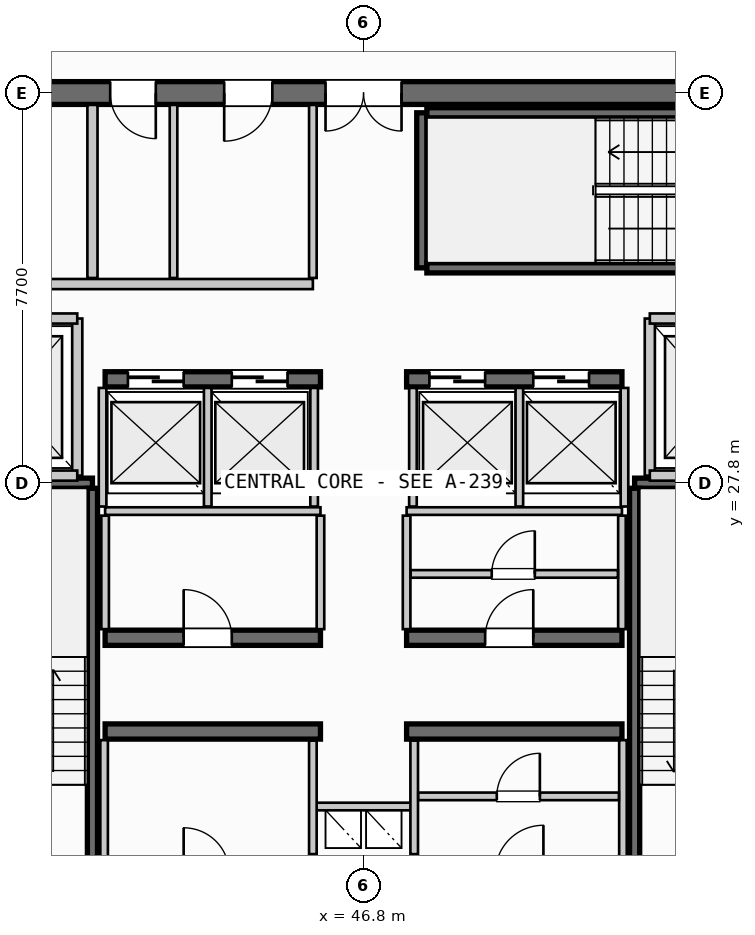
"""IFC4 building model, lengths in metres.
Left out: names, types, materials, properties, quantities, classifications, styles, units other than length and angle.
Written with IfcOpenShell. Run it as: python <this file> out.ifc"""

import sys

from ifc_helpers import new_model, si_unit, direction, frame, frame_2d, origin, place, context, subcontext, project, spatial, rectangle, extrude, source, transform, mapped, element, fill, save


model = new_model("IFC4")
c1 = context("Model", 3, precision=1e-05, world=origin(), true_north=direction((0.0, 1.0)))
c2 = subcontext(c1, "Body", "Model", "MODEL_VIEW")
j1 = project(units=[si_unit("LENGTHUNIT", "METRE"), si_unit("PLANEANGLEUNIT", "RADIAN")], contexts=[c1])
p1 = place(None, origin())
s1 = spatial("IfcSite", under=j1, at=p1, CompositionType="ELEMENT")
p2 = place(p1, origin())
s2 = spatial("IfcBuilding", under=s1, at=p2, CompositionType="ELEMENT")
p3 = place(p2, frame((0.0, 0.0, 283.6)))
s3 = spatial("IfcBuildingStorey", under=s2, at=p3, CompositionType="ELEMENT", Elevation=283.6)
p4 = place(p3, frame((55.6, 35.5, 0.0), z_axis=(0.0, 0.0, 1.0), x_axis=(-1.0, 0.0, 0.0)))
e1 = element("IfcWall", 1, at=p4, inside=s3, PredefinedType="SHEAR", context=c2, shape_type="SweptSolid", body=[
    extrude(rectangle(XDim=17.6, YDim=0.45, at=frame_2d((8.8, 0.0))), origin(), (0.0, 0.0, 1.0), 3.21),
])
p5 = place(p4, frame((8.05, 0.0, 0.0)))
e2 = element("IfcOpeningElement", 2, at=p5, cuts=e1, PredefinedType="OPENING", context=c2, shape_type="SweptSolid", body=[
    extrude(rectangle(XDim=1.5, YDim=2.2, at=frame_2d((0.75, 1.1))), frame((0.0, 0.235, 0.0), z_axis=(0.0, -1.0, 0.0), x_axis=(1.0, 0.0, 0.0)), (0.0, 0.0, 1.0), 0.47),
])
p6 = place(p4, frame((15.1, 0.0, 0.0)))
e3 = element("IfcOpeningElement", 3, at=p6, cuts=e1, PredefinedType="OPENING", context=c2, shape_type="SweptSolid", body=[
    extrude(rectangle(XDim=0.95, YDim=2.15, at=frame_2d((0.475, 1.075))), frame((0.0, 0.235, 0.0), z_axis=(0.0, -1.0, 0.0), x_axis=(1.0, 0.0, 0.0)), (0.0, 0.0, 1.0), 0.47),
])
p7 = place(p4, frame((12.9, 0.0, 0.0)))
e4 = element("IfcOpeningElement", 4, at=p7, cuts=e1, PredefinedType="OPENING", context=c2, shape_type="SweptSolid", body=[
    extrude(rectangle(XDim=0.9, YDim=2.15, at=frame_2d((0.45, 1.075))), frame((0.0, 0.235, 0.0), z_axis=(0.0, -1.0, 0.0), x_axis=(1.0, 0.0, 0.0)), (0.0, 0.0, 1.0), 0.47),
])
p8 = place(p4, frame((10.6, 0.0, 0.0)))
e5 = element("IfcOpeningElement", 5, at=p8, cuts=e1, PredefinedType="OPENING", context=c2, shape_type="SweptSolid", body=[
    extrude(rectangle(XDim=0.95, YDim=2.15, at=frame_2d((0.475, 1.075))), frame((0.0, 0.235, 0.0), z_axis=(0.0, -1.0, 0.0), x_axis=(1.0, 0.0, 0.0)), (0.0, 0.0, 1.0), 0.47),
])
for number, where, z_axis, x_axis in (
    (6, (41.7, 22.9, 0.0), (0.0, 0.0, 1.0), (1.0, 0.0, 0.0)),
    (7, (47.65, 22.9, 0.0), (0.0, 0.0, 1.0), (1.0, 0.0, 0.0)),
):
    element("IfcWall", number, at=place(p3, frame(where, z_axis=z_axis, x_axis=x_axis)), inside=s3, PredefinedType="SHEAR", context=c2, shape_type="SweptSolid", body=[
        extrude(rectangle(XDim=4.25, YDim=0.3, at=frame_2d((2.125, 0.0))), origin(), (0.0, 0.0, 1.0), 3.21),
    ])
p9 = place(p3, frame((41.7, 24.75, 0.0), z_axis=(0.0, 0.0, 1.0), x_axis=(1.0, 0.0, 0.0)))
e8 = element("IfcWall", 8, at=p9, inside=s3, PredefinedType="SHEAR", context=c2, shape_type="SweptSolid", body=[
    extrude(rectangle(XDim=4.25, YDim=0.3, at=frame_2d((2.125, 0.0))), origin(), (0.0, 0.0, 1.0), 3.21),
])
p10 = place(p9, frame((1.55, 0.0, 0.0)))
e9 = element("IfcOpeningElement", 9, at=p10, cuts=e8, PredefinedType="OPENING", context=c2, shape_type="SweptSolid", body=[
    extrude(rectangle(XDim=0.95, YDim=2.15, at=frame_2d((0.475, 1.075))), frame((0.0, 0.16, 0.0), z_axis=(0.0, -1.0, 0.0), x_axis=(1.0, 0.0, 0.0)), (0.0, 0.0, 1.0), 0.32),
])
p11 = place(p3, frame((47.65, 24.75, 0.0), z_axis=(0.0, 0.0, 1.0), x_axis=(1.0, 0.0, 0.0)))
e10 = element("IfcWall", 10, at=p11, inside=s3, PredefinedType="SHEAR", context=c2, shape_type="SweptSolid", body=[
    extrude(rectangle(XDim=4.25, YDim=0.3, at=frame_2d((2.125, 0.0))), origin(), (0.0, 0.0, 1.0), 3.21),
])
p12 = place(p11, frame((1.55, 0.0, 0.0)))
e11 = element("IfcOpeningElement", 11, at=p12, cuts=e10, PredefinedType="OPENING", context=c2, shape_type="SweptSolid", body=[
    extrude(rectangle(XDim=0.95, YDim=2.15, at=frame_2d((0.475, 1.075))), frame((0.0, 0.16, 0.0), z_axis=(0.0, -1.0, 0.0), x_axis=(1.0, 0.0, 0.0)), (0.0, 0.0, 1.0), 0.32),
])
p13 = place(p3, frame((41.7, 29.85, 0.0), z_axis=(0.0, 0.0, 1.0), x_axis=(1.0, 0.0, 0.0)))
e12 = element("IfcWall", 12, at=p13, inside=s3, PredefinedType="SHEAR", context=c2, shape_type="SweptSolid", body=[
    extrude(rectangle(XDim=4.25, YDim=0.3, at=frame_2d((2.125, 0.0))), origin(), (0.0, 0.0, 1.0), 3.21),
])
p14 = place(p13, frame((0.45, 0.0, 0.0)))
e13 = element("IfcOpeningElement", 13, at=p14, cuts=e12, PredefinedType="OPENING", context=c2, shape_type="SweptSolid", body=[
    extrude(rectangle(XDim=1.1, YDim=2.2, at=frame_2d((0.55, 1.1))), frame((0.0, 0.16, 0.0), z_axis=(0.0, -1.0, 0.0), x_axis=(1.0, 0.0, 0.0)), (0.0, 0.0, 1.0), 0.32),
])
p15 = place(p13, frame((2.5, 0.0, 0.0)))
e14 = element("IfcOpeningElement", 14, at=p15, cuts=e12, PredefinedType="OPENING", context=c2, shape_type="SweptSolid", body=[
    extrude(rectangle(XDim=1.1, YDim=2.2, at=frame_2d((0.55, 1.1))), frame((0.0, 0.16, 0.0), z_axis=(0.0, -1.0, 0.0), x_axis=(1.0, 0.0, 0.0)), (0.0, 0.0, 1.0), 0.32),
])
p16 = place(p3, frame((47.65, 29.85, 0.0), z_axis=(0.0, 0.0, 1.0), x_axis=(1.0, 0.0, 0.0)))
e15 = element("IfcWall", 15, at=p16, inside=s3, PredefinedType="SHEAR", context=c2, shape_type="SweptSolid", body=[
    extrude(rectangle(XDim=4.25, YDim=0.3, at=frame_2d((2.125, 0.0))), origin(), (0.0, 0.0, 1.0), 3.21),
])
p17 = place(p16, frame((0.45, 0.0, 0.0)))
e16 = element("IfcOpeningElement", 16, at=p17, cuts=e15, PredefinedType="OPENING", context=c2, shape_type="SweptSolid", body=[
    extrude(rectangle(XDim=1.1, YDim=2.2, at=frame_2d((0.55, 1.1))), frame((0.0, 0.16, 0.0), z_axis=(0.0, -1.0, 0.0), x_axis=(1.0, 0.0, 0.0)), (0.0, 0.0, 1.0), 0.32),
])
p18 = place(p16, frame((2.5, 0.0, 0.0)))
e17 = element("IfcOpeningElement", 17, at=p18, cuts=e15, PredefinedType="OPENING", context=c2, shape_type="SweptSolid", body=[
    extrude(rectangle(XDim=1.1, YDim=2.2, at=frame_2d((0.55, 1.1))), frame((0.0, 0.16, 0.0), z_axis=(0.0, -1.0, 0.0), x_axis=(1.0, 0.0, 0.0)), (0.0, 0.0, 1.0), 0.32),
])
p19 = place(p3, frame((38.39, 27.8, 0.0), z_axis=(0.0, 0.0, 1.0), x_axis=(1.0, 0.0, 0.0)))
e18 = element("IfcWall", 18, at=p19, inside=s3, PredefinedType="SHEAR", context=c2, shape_type="SweptSolid", body=[
    extrude(rectangle(XDim=3.06, YDim=0.2, at=frame_2d((1.53, 0.0))), origin(), (0.0, 0.0, 1.0), 3.21),
])
p20 = place(p3, frame((41.45, 27.7, 0.0), z_axis=(0.0, 0.0, 1.0), x_axis=(0.0, -1.0, 0.0)))
e19 = element("IfcWall", 19, at=p20, inside=s3, PredefinedType="SHEAR", context=c2, shape_type="SweptSolid", body=[
    extrude(rectangle(XDim=7.35, YDim=0.2, at=frame_2d((3.675, 0.0))), origin(), (0.0, 0.0, 1.0), 3.21),
])
p21 = place(p3, frame((52.15, 27.8, 0.0), z_axis=(0.0, 0.0, 1.0), x_axis=(1.0, 0.0, 0.0)))
e20 = element("IfcWall", 20, at=p21, inside=s3, PredefinedType="SHEAR", context=c2, shape_type="SweptSolid", body=[
    extrude(rectangle(XDim=3.06, YDim=0.2, at=frame_2d((1.53, 0.0))), origin(), (0.0, 0.0, 1.0), 3.21),
])
p22 = place(p3, frame((52.15, 20.35, 0.0), z_axis=(0.0, 0.0, 1.0), x_axis=(0.0, 1.0, 0.0)))
e21 = element("IfcWall", 21, at=p22, inside=s3, PredefinedType="SHEAR", context=c2, shape_type="SweptSolid", body=[
    extrude(rectangle(XDim=7.35, YDim=0.2, at=frame_2d((3.675, 0.0))), origin(), (0.0, 0.0, 1.0), 3.21),
])
p23 = place(p3, frame((47.95, 32.05, 0.0), z_axis=(0.0, 0.0, 1.0), x_axis=(0.0, 1.0, 0.0)))
e22 = element("IfcWall", 22, at=p23, inside=s3, PredefinedType="SHEAR", context=c2, shape_type="SweptSolid", body=[
    extrude(rectangle(XDim=3.06, YDim=0.2, at=frame_2d((1.53, 0.0))), origin(), (0.0, 0.0, 1.0), 3.21),
])
for number, where, z_axis, x_axis in (
    (23, (48.05, 35.11, 0.0), (0.0, 0.0, 1.0), (1.0, 0.0, 0.0)),
    (24, (55.4, 32.05, 0.0), (0.0, 0.0, 1.0), (-1.0, 0.0, 0.0)),
):
    element("IfcWall", number, at=place(p3, frame(where, z_axis=z_axis, x_axis=x_axis)), inside=s3, PredefinedType="SHEAR", context=c2, shape_type="SweptSolid", body=[
        extrude(rectangle(XDim=7.35, YDim=0.2, at=frame_2d((3.675, 0.0))), origin(), (0.0, 0.0, 1.0), 3.21),
    ])
p24 = place(p3, frame((45.8, 21.42, 0.0), z_axis=(0.0, 0.0, 1.0), x_axis=(1.0, 0.0, 0.0)))
e25 = element("IfcWall", 25, at=p24, inside=s3, PredefinedType="PARTITIONING", context=c2, shape_type="SweptSolid", body=[
    extrude(rectangle(XDim=2.0, YDim=0.15, at=frame_2d((1.0, 0.0))), origin(), (0.0, 0.0, 1.0), 2.455),
])
for number, where, z_axis, x_axis in (
    (26, (45.8, 20.48, 0.0), (0.0, 0.0, 1.0), (0.0, 1.0, 0.0)),
    (27, (47.8, 20.48, 0.0), (0.0, 0.0, 1.0), (0.0, 1.0, 0.0)),
):
    element("IfcWall", number, at=place(p3, frame(where, z_axis=z_axis, x_axis=x_axis)), inside=s3, PredefinedType="PARTITIONING", context=c2, shape_type="SweptSolid", body=[
        extrude(rectangle(XDim=2.24, YDim=0.15, at=frame_2d((1.12, 0.0))), origin(), (0.0, 0.0, 1.0), 2.455),
    ])
p25 = place(p3, frame((41.15, 27.95, 0.0), z_axis=(0.0, 0.0, 1.0), x_axis=(0.0, 1.0, 0.0)))
e28 = element("IfcWall", 28, at=p25, inside=s3, PredefinedType="PARTITIONING", context=c2, shape_type="SweptSolid", body=[
    extrude(rectangle(XDim=3.1, YDim=0.2, at=frame_2d((1.55, 0.0))), origin(), (0.0, 0.0, 1.0), 2.455),
])
for number, where, z_axis, x_axis in (
    (29, (38.235, 27.95, 0.0), (0.0, 0.0, 1.0), (1.0, 0.0, 0.0)),
    (30, (38.235, 31.05, 0.0), (0.0, 0.0, 1.0), (1.0, 0.0, 0.0)),
):
    element("IfcWall", number, at=place(p3, frame(where, z_axis=z_axis, x_axis=x_axis)), inside=s3, PredefinedType="PARTITIONING", context=c2, shape_type="SweptSolid", body=[
        extrude(rectangle(XDim=2.915, YDim=0.2, at=frame_2d((1.458, 0.0))), origin(), (0.0, 0.0, 1.0), 2.455),
    ])
p26 = place(p3, frame((52.45, 27.95, 0.0), z_axis=(0.0, 0.0, 1.0), x_axis=(0.0, 1.0, 0.0)))
e31 = element("IfcWall", 31, at=p26, inside=s3, PredefinedType="PARTITIONING", context=c2, shape_type="SweptSolid", body=[
    extrude(rectangle(XDim=3.1, YDim=0.2, at=frame_2d((1.55, 0.0))), origin(), (0.0, 0.0, 1.0), 2.455),
])
for number, where, z_axis, x_axis in (
    (32, (52.45, 27.95, 0.0), (0.0, 0.0, 1.0), (1.0, 0.0, 0.0)),
    (33, (52.45, 31.05, 0.0), (0.0, 0.0, 1.0), (1.0, 0.0, 0.0)),
):
    element("IfcWall", number, at=place(p3, frame(where, z_axis=z_axis, x_axis=x_axis)), inside=s3, PredefinedType="PARTITIONING", context=c2, shape_type="SweptSolid", body=[
        extrude(rectangle(XDim=2.915, YDim=0.2, at=frame_2d((1.458, 0.0))), origin(), (0.0, 0.0, 1.0), 2.455),
    ])
for number, where, z_axis, x_axis in (
    (34, (41.68, 20.335, 0.0), (0.0, 0.0, 1.0), (0.0, 1.0, 0.0)),
    (35, (51.92, 20.335, 0.0), (0.0, 0.0, 1.0), (0.0, 1.0, 0.0)),
):
    element("IfcWall", number, at=place(p3, frame(where, z_axis=z_axis, x_axis=x_axis)), inside=s3, PredefinedType="PARTITIONING", context=c2, shape_type="SweptSolid", body=[
        extrude(rectangle(XDim=2.395, YDim=0.15, at=frame_2d((1.198, 0.0))), origin(), (0.0, 0.0, 1.0), 2.455),
    ])
p27 = place(p3, frame((47.88, 21.62, 0.0), z_axis=(0.0, 0.0, 1.0), x_axis=(1.0, 0.0, 0.0)))
e36 = element("IfcWall", 36, at=p27, inside=s3, PredefinedType="PARTITIONING", context=c2, shape_type="SweptSolid", body=[
    extrude(rectangle(XDim=3.96, YDim=0.15, at=frame_2d((1.98, 0.0))), origin(), (0.0, 0.0, 1.0), 2.455),
])
p28 = place(p27, frame((1.55, 0.0, 0.0)))
e37 = element("IfcOpeningElement", 37, at=p28, cuts=e36, PredefinedType="OPENING", context=c2, shape_type="SweptSolid", body=[
    extrude(rectangle(XDim=0.85, YDim=2.15, at=frame_2d((0.425, 1.075))), frame((0.0, 0.085, 0.0), z_axis=(0.0, -1.0, 0.0), x_axis=(1.0, 0.0, 0.0)), (0.0, 0.0, 1.0), 0.17),
])
for number, where, z_axis, x_axis in (
    (38, (41.7, 27.25, 0.0), (0.0, 0.0, 1.0), (1.0, 0.0, 0.0)),
    (39, (47.65, 27.25, 0.0), (0.0, 0.0, 1.0), (1.0, 0.0, 0.0)),
):
    element("IfcWall", number, at=place(p3, frame(where, z_axis=z_axis, x_axis=x_axis)), inside=s3, PredefinedType="PARTITIONING", context=c2, shape_type="SweptSolid", body=[
        extrude(rectangle(XDim=4.25, YDim=0.15, at=frame_2d((2.125, 0.0))), origin(), (0.0, 0.0, 1.0), 2.455),
    ])
for number, where, z_axis, x_axis in (
    (40, (41.7, 24.92, 0.0), (0.0, 0.0, 1.0), (0.0, 1.0, 0.0)),
    (41, (45.95, 24.92, 0.0), (0.0, 0.0, 1.0), (0.0, 1.0, 0.0)),
    (42, (47.65, 24.92, 0.0), (0.0, 0.0, 1.0), (0.0, 1.0, 0.0)),
    (43, (51.9, 24.92, 0.0), (0.0, 0.0, 1.0), (0.0, 1.0, 0.0)),
):
    element("IfcWall", number, at=place(p3, frame(where, z_axis=z_axis, x_axis=x_axis)), inside=s3, PredefinedType="PARTITIONING", context=c2, shape_type="SweptSolid", body=[
        extrude(rectangle(XDim=2.24, YDim=0.15, at=frame_2d((1.12, 0.0))), origin(), (0.0, 0.0, 1.0), 2.455),
    ])
p29 = place(p3, frame((47.73, 26.01, 0.0), z_axis=(0.0, 0.0, 1.0), x_axis=(1.0, 0.0, 0.0)))
e44 = element("IfcWall", 44, at=p29, inside=s3, PredefinedType="PARTITIONING", context=c2, shape_type="SweptSolid", body=[
    extrude(rectangle(XDim=4.09, YDim=0.15, at=frame_2d((2.045, 0.0))), origin(), (0.0, 0.0, 1.0), 2.455),
])
p30 = place(p29, frame((1.6, 0.0, 0.0)))
e45 = element("IfcOpeningElement", 45, at=p30, cuts=e44, PredefinedType="OPENING", context=c2, shape_type="SweptSolid", body=[
    extrude(rectangle(XDim=0.85, YDim=2.15, at=frame_2d((0.425, 1.075))), frame((0.0, 0.085, 0.0), z_axis=(0.0, -1.0, 0.0), x_axis=(1.0, 0.0, 0.0)), (0.0, 0.0, 1.0), 0.17),
])
for number, where, z_axis, x_axis in (
    (46, (41.65, 27.34, 0.0), (0.0, 0.0, 1.0), (0.0, 1.0, 0.0)),
    (47, (43.725, 27.34, 0.0), (0.0, 0.0, 1.0), (0.0, 1.0, 0.0)),
    (48, (45.825, 27.34, 0.0), (0.0, 0.0, 1.0), (0.0, 1.0, 0.0)),
    (49, (47.775, 27.34, 0.0), (0.0, 0.0, 1.0), (0.0, 1.0, 0.0)),
    (50, (49.875, 27.34, 0.0), (0.0, 0.0, 1.0), (0.0, 1.0, 0.0)),
    (51, (51.95, 27.34, 0.0), (0.0, 0.0, 1.0), (0.0, 1.0, 0.0)),
):
    element("IfcWall", number, at=place(p3, frame(where, z_axis=z_axis, x_axis=x_axis)), inside=s3, PredefinedType="PARTITIONING", context=c2, shape_type="SweptSolid", body=[
        extrude(rectangle(XDim=2.34, YDim=0.15, at=frame_2d((1.17, 0.0))), origin(), (0.0, 0.0, 1.0), 2.455),
    ])
p31 = place(p3, frame((41.45, 31.85, 0.0), z_axis=(0.0, 0.0, 1.0), x_axis=(0.0, 1.0, 0.0)))
e52 = element("IfcWall", 52, at=p31, inside=s3, PredefinedType="PARTITIONING", context=c2, shape_type="SweptSolid", body=[
    extrude(rectangle(XDim=3.415, YDim=0.2, at=frame_2d((1.708, 0.0))), origin(), (0.0, 0.0, 1.0), 2.455),
])
p32 = place(p3, frame((38.235, 31.73, 0.0), z_axis=(0.0, 0.0, 1.0), x_axis=(1.0, 0.0, 0.0)))
e53 = element("IfcWall", 53, at=p32, inside=s3, PredefinedType="PARTITIONING", context=c2, shape_type="SweptSolid", body=[
    extrude(rectangle(XDim=7.565, YDim=0.2, at=frame_2d((3.782, 0.0))), origin(), (0.0, 0.0, 1.0), 2.455),
])
p33 = place(p3, frame((45.8, 31.85, 0.0), z_axis=(0.0, 0.0, 1.0), x_axis=(0.0, 1.0, 0.0)))
e54 = element("IfcWall", 54, at=p33, inside=s3, PredefinedType="PARTITIONING", context=c2, shape_type="SweptSolid", body=[
    extrude(rectangle(XDim=3.415, YDim=0.15, at=frame_2d((1.708, 0.0))), origin(), (0.0, 0.0, 1.0), 2.455),
])
p34 = place(p3, frame((43.05, 31.85, 0.0), z_axis=(0.0, 0.0, 1.0), x_axis=(0.0, 1.0, 0.0)))
e55 = element("IfcWall", 55, at=p34, inside=s3, PredefinedType="PLUMBINGWALL", context=c2, shape_type="SweptSolid", body=[
    extrude(rectangle(XDim=3.415, YDim=0.15, at=frame_2d((1.708, 0.0))), origin(), (0.0, 0.0, 1.0), 2.455),
])
m1 = source(origin(), c2, "Body", "SweptSolid", [
    extrude(rectangle(XDim=1.5, YDim=2.2, at=frame_2d((0.75, 1.1))), frame((0.0, 0.025, 0.0), z_axis=(0.0, -1.0, 0.0), x_axis=(1.0, 0.0, 0.0)), (0.0, 0.0, 1.0), 0.05),
])
p35 = place(p5, origin())
e56 = element("IfcDoor", 56, at=p35, inside=s3, OperationType="DOUBLE_DOOR_SINGLE_SWING", PredefinedType="DOOR", context=c2, shape_type="MappedRepresentation", body=[
    mapped(m1, transform((0.0, 0.0, 0.0), scale=1.0)),
])
fill(e2, e56)
m2 = source(origin(), c2, "Body", "SweptSolid", [
    extrude(rectangle(XDim=0.95, YDim=2.15, at=frame_2d((0.475, 1.075))), frame((0.0, 0.025, 0.0), z_axis=(0.0, -1.0, 0.0), x_axis=(1.0, 0.0, 0.0)), (0.0, 0.0, 1.0), 0.05),
])
p36 = place(p10, origin())
e57 = element("IfcDoor", 57, at=p36, inside=s3, OperationType="SINGLE_SWING_LEFT", PredefinedType="DOOR", context=c2, shape_type="MappedRepresentation", body=[
    mapped(m2, transform((0.0, 0.0, 0.0), scale=1.0)),
])
fill(e9, e57)
p37 = place(p12, origin())
e58 = element("IfcDoor", 58, at=p37, inside=s3, OperationType="SINGLE_SWING_RIGHT", PredefinedType="DOOR", context=c2, shape_type="MappedRepresentation", body=[
    mapped(m2, transform((0.0, 0.0, 0.0), scale=1.0)),
])
fill(e11, e58)
m3 = source(origin(), c2, "Body", "SweptSolid", [
    extrude(rectangle(XDim=1.1, YDim=2.2, at=frame_2d((0.55, 1.1))), frame((0.0, 0.025, 0.0), z_axis=(0.0, -1.0, 0.0), x_axis=(1.0, 0.0, 0.0)), (0.0, 0.0, 1.0), 0.05),
])
p38 = place(p14, origin())
e59 = element("IfcDoor", 59, at=p38, inside=s3, OperationType="SLIDING_TO_LEFT", PredefinedType="DOOR", context=c2, shape_type="MappedRepresentation", body=[
    mapped(m3, transform((0.0, 0.0, 0.0), scale=1.0)),
])
fill(e13, e59)
p39 = place(p15, origin())
e60 = element("IfcDoor", 60, at=p39, inside=s3, OperationType="SLIDING_TO_LEFT", PredefinedType="DOOR", context=c2, shape_type="MappedRepresentation", body=[
    mapped(m3, transform((0.0, 0.0, 0.0), scale=1.0)),
])
fill(e14, e60)
p40 = place(p17, origin())
e61 = element("IfcDoor", 61, at=p40, inside=s3, OperationType="SLIDING_TO_LEFT", PredefinedType="DOOR", context=c2, shape_type="MappedRepresentation", body=[
    mapped(m3, transform((0.0, 0.0, 0.0), scale=1.0)),
])
fill(e16, e61)
p41 = place(p18, origin())
e62 = element("IfcDoor", 62, at=p41, inside=s3, OperationType="SLIDING_TO_LEFT", PredefinedType="DOOR", context=c2, shape_type="MappedRepresentation", body=[
    mapped(m3, transform((0.0, 0.0, 0.0), scale=1.0)),
])
fill(e17, e62)
m4 = source(origin(), c2, "Body", "SweptSolid", [
    extrude(rectangle(XDim=0.9, YDim=2.15, at=frame_2d((0.45, 1.075))), frame((0.0, 0.025, 0.0), z_axis=(0.0, -1.0, 0.0), x_axis=(1.0, 0.0, 0.0)), (0.0, 0.0, 1.0), 0.05),
])
p42 = place(p7, origin())
e63 = element("IfcDoor", 63, at=p42, inside=s3, OperationType="SINGLE_SWING_LEFT", PredefinedType="DOOR", context=c2, shape_type="MappedRepresentation", body=[
    mapped(m4, transform((0.0, 0.0, 0.0), scale=1.0)),
])
fill(e4, e63)
p43 = place(p8, origin())
e64 = element("IfcDoor", 64, at=p43, inside=s3, OperationType="SINGLE_SWING_RIGHT", PredefinedType="DOOR", context=c2, shape_type="MappedRepresentation", body=[
    mapped(m2, transform((0.0, 0.0, 0.0), scale=1.0)),
])
fill(e5, e64)
m5 = source(origin(), c2, "Body", "SweptSolid", [
    extrude(rectangle(XDim=0.85, YDim=2.15, at=frame_2d((0.425, 1.075))), frame((0.0, 0.025, 0.0), z_axis=(0.0, -1.0, 0.0), x_axis=(1.0, 0.0, 0.0)), (0.0, 0.0, 1.0), 0.05),
])
p44 = place(p28, origin())
e65 = element("IfcDoor", 65, at=p44, inside=s3, OperationType="SINGLE_SWING_RIGHT", PredefinedType="DOOR", context=c2, shape_type="MappedRepresentation", body=[
    mapped(m5, transform((0.0, 0.0, 0.0), scale=1.0)),
])
fill(e37, e65)
p45 = place(p30, origin())
e66 = element("IfcDoor", 66, at=p45, inside=s3, OperationType="SINGLE_SWING_RIGHT", PredefinedType="DOOR", context=c2, shape_type="MappedRepresentation", body=[
    mapped(m5, transform((0.0, 0.0, 0.0), scale=1.0)),
])
fill(e45, e66)
save(model, sys.argv[1])
